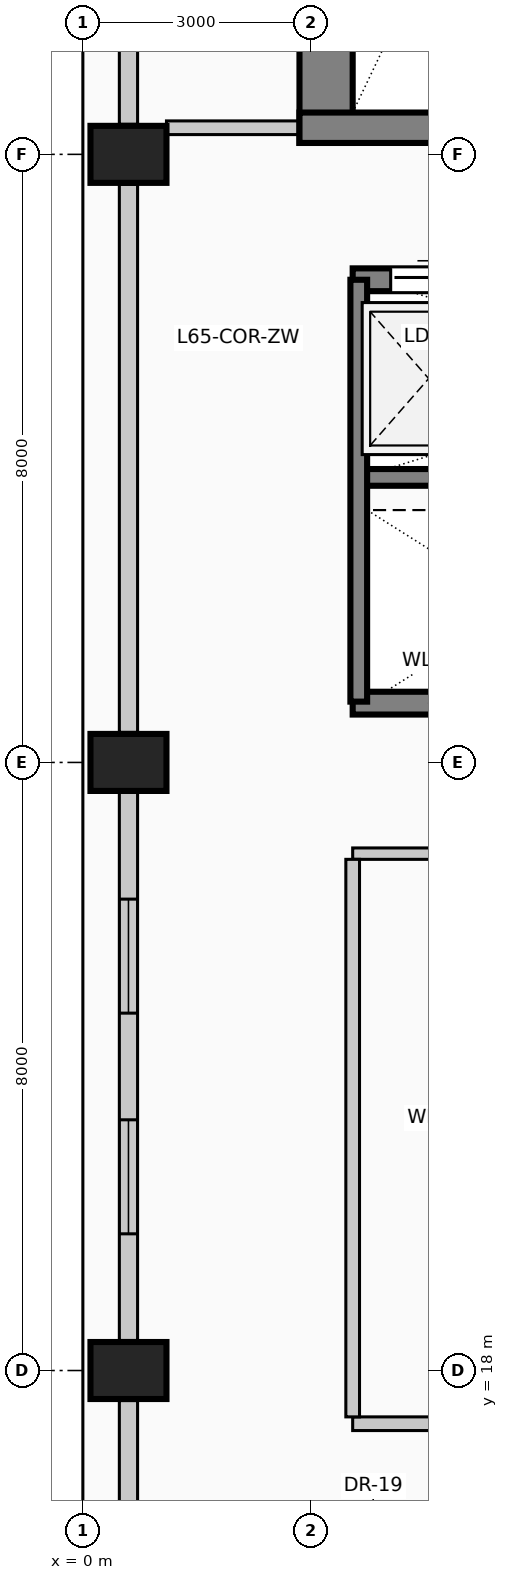
"""IFC4 building model, lengths in metres.
Left out: names, types, materials, properties, quantities, classifications, styles, units other than length and angle.
Written with IfcOpenShell. Run it as: python <this file> out.ifc"""

import sys

from ifc_helpers import new_model, si_unit, direction, frame, frame_2d, origin, origin_2d, place, context, subcontext, project, spatial, rectangle, extrude, element, fill, save


model = new_model("IFC4")
c1 = context("Model", 3, precision=1e-05, world=origin(), true_north=direction((0.0, 1.0)))
c2 = subcontext(c1, "Body", "Model", "MODEL_VIEW")
j1 = project(units=[si_unit("LENGTHUNIT", "METRE"), si_unit("PLANEANGLEUNIT", "RADIAN")], contexts=[c1])
p1 = place(None, origin())
s1 = spatial("IfcSite", under=j1, at=p1, CompositionType="ELEMENT")
p2 = place(p1, origin())
s2 = spatial("IfcBuilding", under=s1, at=p2, CompositionType="ELEMENT")
p3 = place(p2, frame((0.0, 0.0, 268.6)))
s3 = spatial("IfcBuildingStorey", under=s2, at=p3, CompositionType="ELEMENT", Elevation=268.6)
p4 = place(p3, frame((3.2, 34.15, 0.0), z_axis=(0.0, 0.0, 1.0), x_axis=(0.0, 1.0, 0.0)))
e1 = element("IfcWall", 1, at=p4, inside=s3, PredefinedType="SHEAR", context=c2, shape_type="SweptSolid", body=[
    extrude(rectangle(XDim=8.98, YDim=0.7, at=frame_2d((4.49, 0.0))), origin(), (0.0, 0.0, 1.0), 4.0),
])
p5 = place(p3, frame((2.85, 34.35, 0.0), z_axis=(0.0, 0.0, 1.0), x_axis=(1.0, 0.0, 0.0)))
e2 = element("IfcWall", 2, at=p5, inside=s3, PredefinedType="SHEAR", context=c2, shape_type="SweptSolid", body=[
    extrude(rectangle(XDim=4.86, YDim=0.4, at=frame_2d((2.43, 0.0))), origin(), (0.0, 0.0, 1.0), 4.0),
])
p6 = place(p5, frame((2.4, 0.0, 0.0)))
e3 = element("IfcOpeningElement", 3, at=p6, cuts=e2, PredefinedType="OPENING", context=c2, shape_type="SweptSolid", body=[
    extrude(rectangle(XDim=1.15, YDim=2.2, at=frame_2d((0.575, 1.1))), frame((0.0, 0.21, 0.0), z_axis=(0.0, -1.0, 0.0), x_axis=(1.0, 0.0, 0.0)), (0.0, 0.0, 1.0), 0.42),
])
for number, where, z_axis, x_axis in (
    (4, (0.6, 18.0, 0.0), (0.0, 0.0, 1.0), (0.0, 1.0, 0.0)),
    (5, (0.6, 26.0, 0.0), (0.0, 0.0, 1.0), (0.0, 1.0, 0.0)),
    (6, (0.6, 34.0, 0.0), (0.0, 0.0, 1.0), (0.0, 1.0, 0.0)),
):
    element("IfcColumn", number, at=place(p3, frame(where, z_axis=z_axis, x_axis=x_axis)), inside=s3, PredefinedType="COLUMN", context=c2, shape_type="SweptSolid", body=[
        extrude(rectangle(XDim=0.75, YDim=1.0, at=origin_2d()), origin(), (0.0, 0.0, 1.0), 4.0),
    ])
p7 = place(p3, frame((0.6, 10.395, 0.0), z_axis=(0.0, 0.0, 1.0), x_axis=(0.0, 1.0, 0.0)))
e7 = element("IfcWall", 7, at=p7, inside=s3, PredefinedType="SOLIDWALL", context=c2, shape_type="SweptSolid", body=[
    extrude(rectangle(XDim=7.21, YDim=0.24, at=frame_2d((3.605, 0.0))), origin(), (0.0, 0.0, 1.0), 3.0),
])
p8 = place(p7, frame((1.403, 0.0, 0.42)))
e8 = element("IfcOpeningElement", 8, at=p8, cuts=e7, PredefinedType="OPENING", context=c2, shape_type="SweptSolid", body=[
    extrude(rectangle(XDim=1.5, YDim=2.2, at=frame_2d((0.75, 1.1))), frame((0.0, 0.13, 0.0), z_axis=(0.0, -1.0, 0.0), x_axis=(1.0, 0.0, 0.0)), (0.0, 0.0, 1.0), 0.26),
])
p9 = place(p3, frame((0.6, 18.395, 0.0), z_axis=(0.0, 0.0, 1.0), x_axis=(0.0, 1.0, 0.0)))
e9 = element("IfcWall", 9, at=p9, inside=s3, PredefinedType="SOLIDWALL", context=c2, shape_type="SweptSolid", body=[
    extrude(rectangle(XDim=7.21, YDim=0.24, at=frame_2d((3.605, 0.0))), origin(), (0.0, 0.0, 1.0), 3.0),
])
p10 = place(p9, frame((1.403, 0.0, 0.42)))
e10 = element("IfcOpeningElement", 10, at=p10, cuts=e9, PredefinedType="OPENING", context=c2, shape_type="SweptSolid", body=[
    extrude(rectangle(XDim=1.5, YDim=2.2, at=frame_2d((0.75, 1.1))), frame((0.0, 0.13, 0.0), z_axis=(0.0, -1.0, 0.0), x_axis=(1.0, 0.0, 0.0)), (0.0, 0.0, 1.0), 0.26),
])
p11 = place(p9, frame((4.307, 0.0, 0.42)))
e11 = element("IfcOpeningElement", 11, at=p11, cuts=e9, PredefinedType="OPENING", context=c2, shape_type="SweptSolid", body=[
    extrude(rectangle(XDim=1.5, YDim=2.2, at=frame_2d((0.75, 1.1))), frame((0.0, 0.13, 0.0), z_axis=(0.0, -1.0, 0.0), x_axis=(1.0, 0.0, 0.0)), (0.0, 0.0, 1.0), 0.26),
])
p12 = place(p3, frame((0.6, 26.395, 0.0), z_axis=(0.0, 0.0, 1.0), x_axis=(0.0, 1.0, 0.0)))
e12 = element("IfcWall", 12, at=p12, inside=s3, PredefinedType="SOLIDWALL", context=c2, shape_type="SweptSolid", body=[
    extrude(rectangle(XDim=7.21, YDim=0.24, at=frame_2d((3.605, 0.0))), origin(), (0.0, 0.0, 1.0), 3.0),
])
p13 = place(p3, frame((0.6, 34.395, 0.0), z_axis=(0.0, 0.0, 1.0), x_axis=(0.0, 1.0, 0.0)))
e13 = element("IfcWall", 13, at=p13, inside=s3, PredefinedType="SOLIDWALL", context=c2, shape_type="SweptSolid", body=[
    extrude(rectangle(XDim=7.61, YDim=0.24, at=frame_2d((3.805, 0.0))), origin(), (0.0, 0.0, 1.0), 3.0),
])
p14 = place(p3, frame((3.55, 32.35, 0.0), z_axis=(0.0, 0.0, 1.0), x_axis=(1.0, 0.0, 0.0)))
e14 = element("IfcWall", 14, at=p14, inside=s3, PredefinedType="SOLIDWALL", context=c2, shape_type="SweptSolid", body=[
    extrude(rectangle(XDim=2.1, YDim=0.3, at=frame_2d((1.05, 0.0))), origin(), (0.0, 0.0, 1.0), 4.0),
])
p15 = place(p14, frame((0.5, 0.0, 0.0)))
e15 = element("IfcOpeningElement", 15, at=p15, cuts=e14, PredefinedType="OPENING", context=c2, shape_type="SweptSolid", body=[
    extrude(rectangle(XDim=1.1, YDim=2.2, at=frame_2d((0.55, 1.1))), frame((0.0, 0.16, 0.0), z_axis=(0.0, -1.0, 0.0), x_axis=(1.0, 0.0, 0.0)), (0.0, 0.0, 1.0), 0.32),
])
p16 = place(p3, frame((5.65, 26.78, 0.0), z_axis=(0.0, 0.0, 1.0), x_axis=(-1.0, 0.0, 0.0)))
e16 = element("IfcWall", 16, at=p16, inside=s3, PredefinedType="SOLIDWALL", context=c2, shape_type="SweptSolid", body=[
    extrude(rectangle(XDim=2.1, YDim=0.3, at=frame_2d((1.05, 0.0))), origin(), (0.0, 0.0, 1.0), 4.0),
])
p17 = place(p3, frame((3.55, 29.75, 0.0), z_axis=(0.0, 0.0, 1.0), x_axis=(1.0, 0.0, 0.0)))
e17 = element("IfcWall", 17, at=p17, inside=s3, PredefinedType="SOLIDWALL", context=c2, shape_type="SweptSolid", body=[
    extrude(rectangle(XDim=8.65, YDim=0.22, at=frame_2d((4.325, 0.0))), origin(), (0.0, 0.0, 1.0), 4.0),
])
p18 = place(p3, frame((3.63, 26.8, 0.0), z_axis=(0.0, 0.0, 1.0), x_axis=(0.0, 1.0, 0.0)))
e18 = element("IfcWall", 18, at=p18, inside=s3, PredefinedType="SOLIDWALL", context=c2, shape_type="SweptSolid", body=[
    extrude(rectangle(XDim=5.55, YDim=0.22, at=frame_2d((2.775, 0.0))), origin(), (0.0, 0.0, 1.0), 4.0),
])
p19 = place(p3, frame((3.55, 17.3, 0.0), z_axis=(0.0, 0.0, 1.0), x_axis=(1.0, 0.0, 0.0)))
e19 = element("IfcWall", 19, at=p19, inside=s3, PredefinedType="PARTITIONING", context=c2, shape_type="SweptSolid", body=[
    extrude(rectangle(XDim=6.25, YDim=0.18, at=frame_2d((3.125, 0.0))), origin(), (0.0, 0.0, 1.0), 3.75),
])
p20 = place(p19, frame((2.6, 0.0, 0.0)))
e20 = element("IfcOpeningElement", 20, at=p20, cuts=e19, PredefinedType="OPENING", context=c2, shape_type="SweptSolid", body=[
    extrude(rectangle(XDim=1.05, YDim=2.15, at=frame_2d((0.525, 1.075))), frame((0.0, 0.1, 0.0), z_axis=(0.0, -1.0, 0.0), x_axis=(1.0, 0.0, 0.0)), (0.0, 0.0, 1.0), 0.2),
])
p21 = place(p3, frame((3.55, 24.8, 0.0), z_axis=(0.0, 0.0, 1.0), x_axis=(1.0, 0.0, 0.0)))
e21 = element("IfcWall", 21, at=p21, inside=s3, PredefinedType="PARTITIONING", context=c2, shape_type="SweptSolid", body=[
    extrude(rectangle(XDim=6.25, YDim=0.15, at=frame_2d((3.125, 0.0))), origin(), (0.0, 0.0, 1.0), 3.75),
])
p22 = place(p3, frame((1.1, 34.35, 0.0), z_axis=(0.0, 0.0, 1.0), x_axis=(1.0, 0.0, 0.0)))
e22 = element("IfcWall", 22, at=p22, inside=s3, PredefinedType="PARTITIONING", context=c2, shape_type="SweptSolid", body=[
    extrude(rectangle(XDim=1.75, YDim=0.18, at=frame_2d((0.875, 0.0))), origin(), (0.0, 0.0, 1.0), 3.75),
])
p23 = place(p3, frame((3.55, 17.39, 0.0), z_axis=(0.0, 0.0, 1.0), x_axis=(0.0, 1.0, 0.0)))
e23 = element("IfcWall", 23, at=p23, inside=s3, PredefinedType="PARTITIONING", context=c2, shape_type="SweptSolid", body=[
    extrude(rectangle(XDim=7.335, YDim=0.18, at=frame_2d((3.667, 0.0))), origin(), (0.0, 0.0, 1.0), 3.75),
])
p24 = place(p10, origin())
e24 = element("IfcWindow", 24, at=p24, inside=s3, PartitioningType="SINGLE_PANEL", PredefinedType="WINDOW", context=c2, shape_type="SweptSolid", body=[
    extrude(rectangle(XDim=1.5, YDim=2.2, at=frame_2d((0.75, 1.1))), frame((0.0, 0.03, 0.0), z_axis=(0.0, -1.0, 0.0), x_axis=(1.0, 0.0, 0.0)), (0.0, 0.0, 1.0), 0.06),
])
fill(e10, e24)
p25 = place(p11, origin())
e25 = element("IfcWindow", 25, at=p25, inside=s3, PartitioningType="SINGLE_PANEL", PredefinedType="WINDOW", context=c2, shape_type="SweptSolid", body=[
    extrude(rectangle(XDim=1.5, YDim=2.2, at=frame_2d((0.75, 1.1))), frame((0.0, 0.03, 0.0), z_axis=(0.0, -1.0, 0.0), x_axis=(1.0, 0.0, 0.0)), (0.0, 0.0, 1.0), 0.06),
])
fill(e11, e25)
p26 = place(p15, origin())
e26 = element("IfcDoor", 26, at=p26, inside=s3, OperationType="SLIDING_TO_LEFT", PredefinedType="DOOR", context=c2, shape_type="SweptSolid", body=[
    extrude(rectangle(XDim=1.1, YDim=2.2, at=frame_2d((0.55, 1.1))), frame((0.0, 0.025, 0.0), z_axis=(0.0, -1.0, 0.0), x_axis=(1.0, 0.0, 0.0)), (0.0, 0.0, 1.0), 0.05),
])
fill(e15, e26)
save(model, sys.argv[1])
